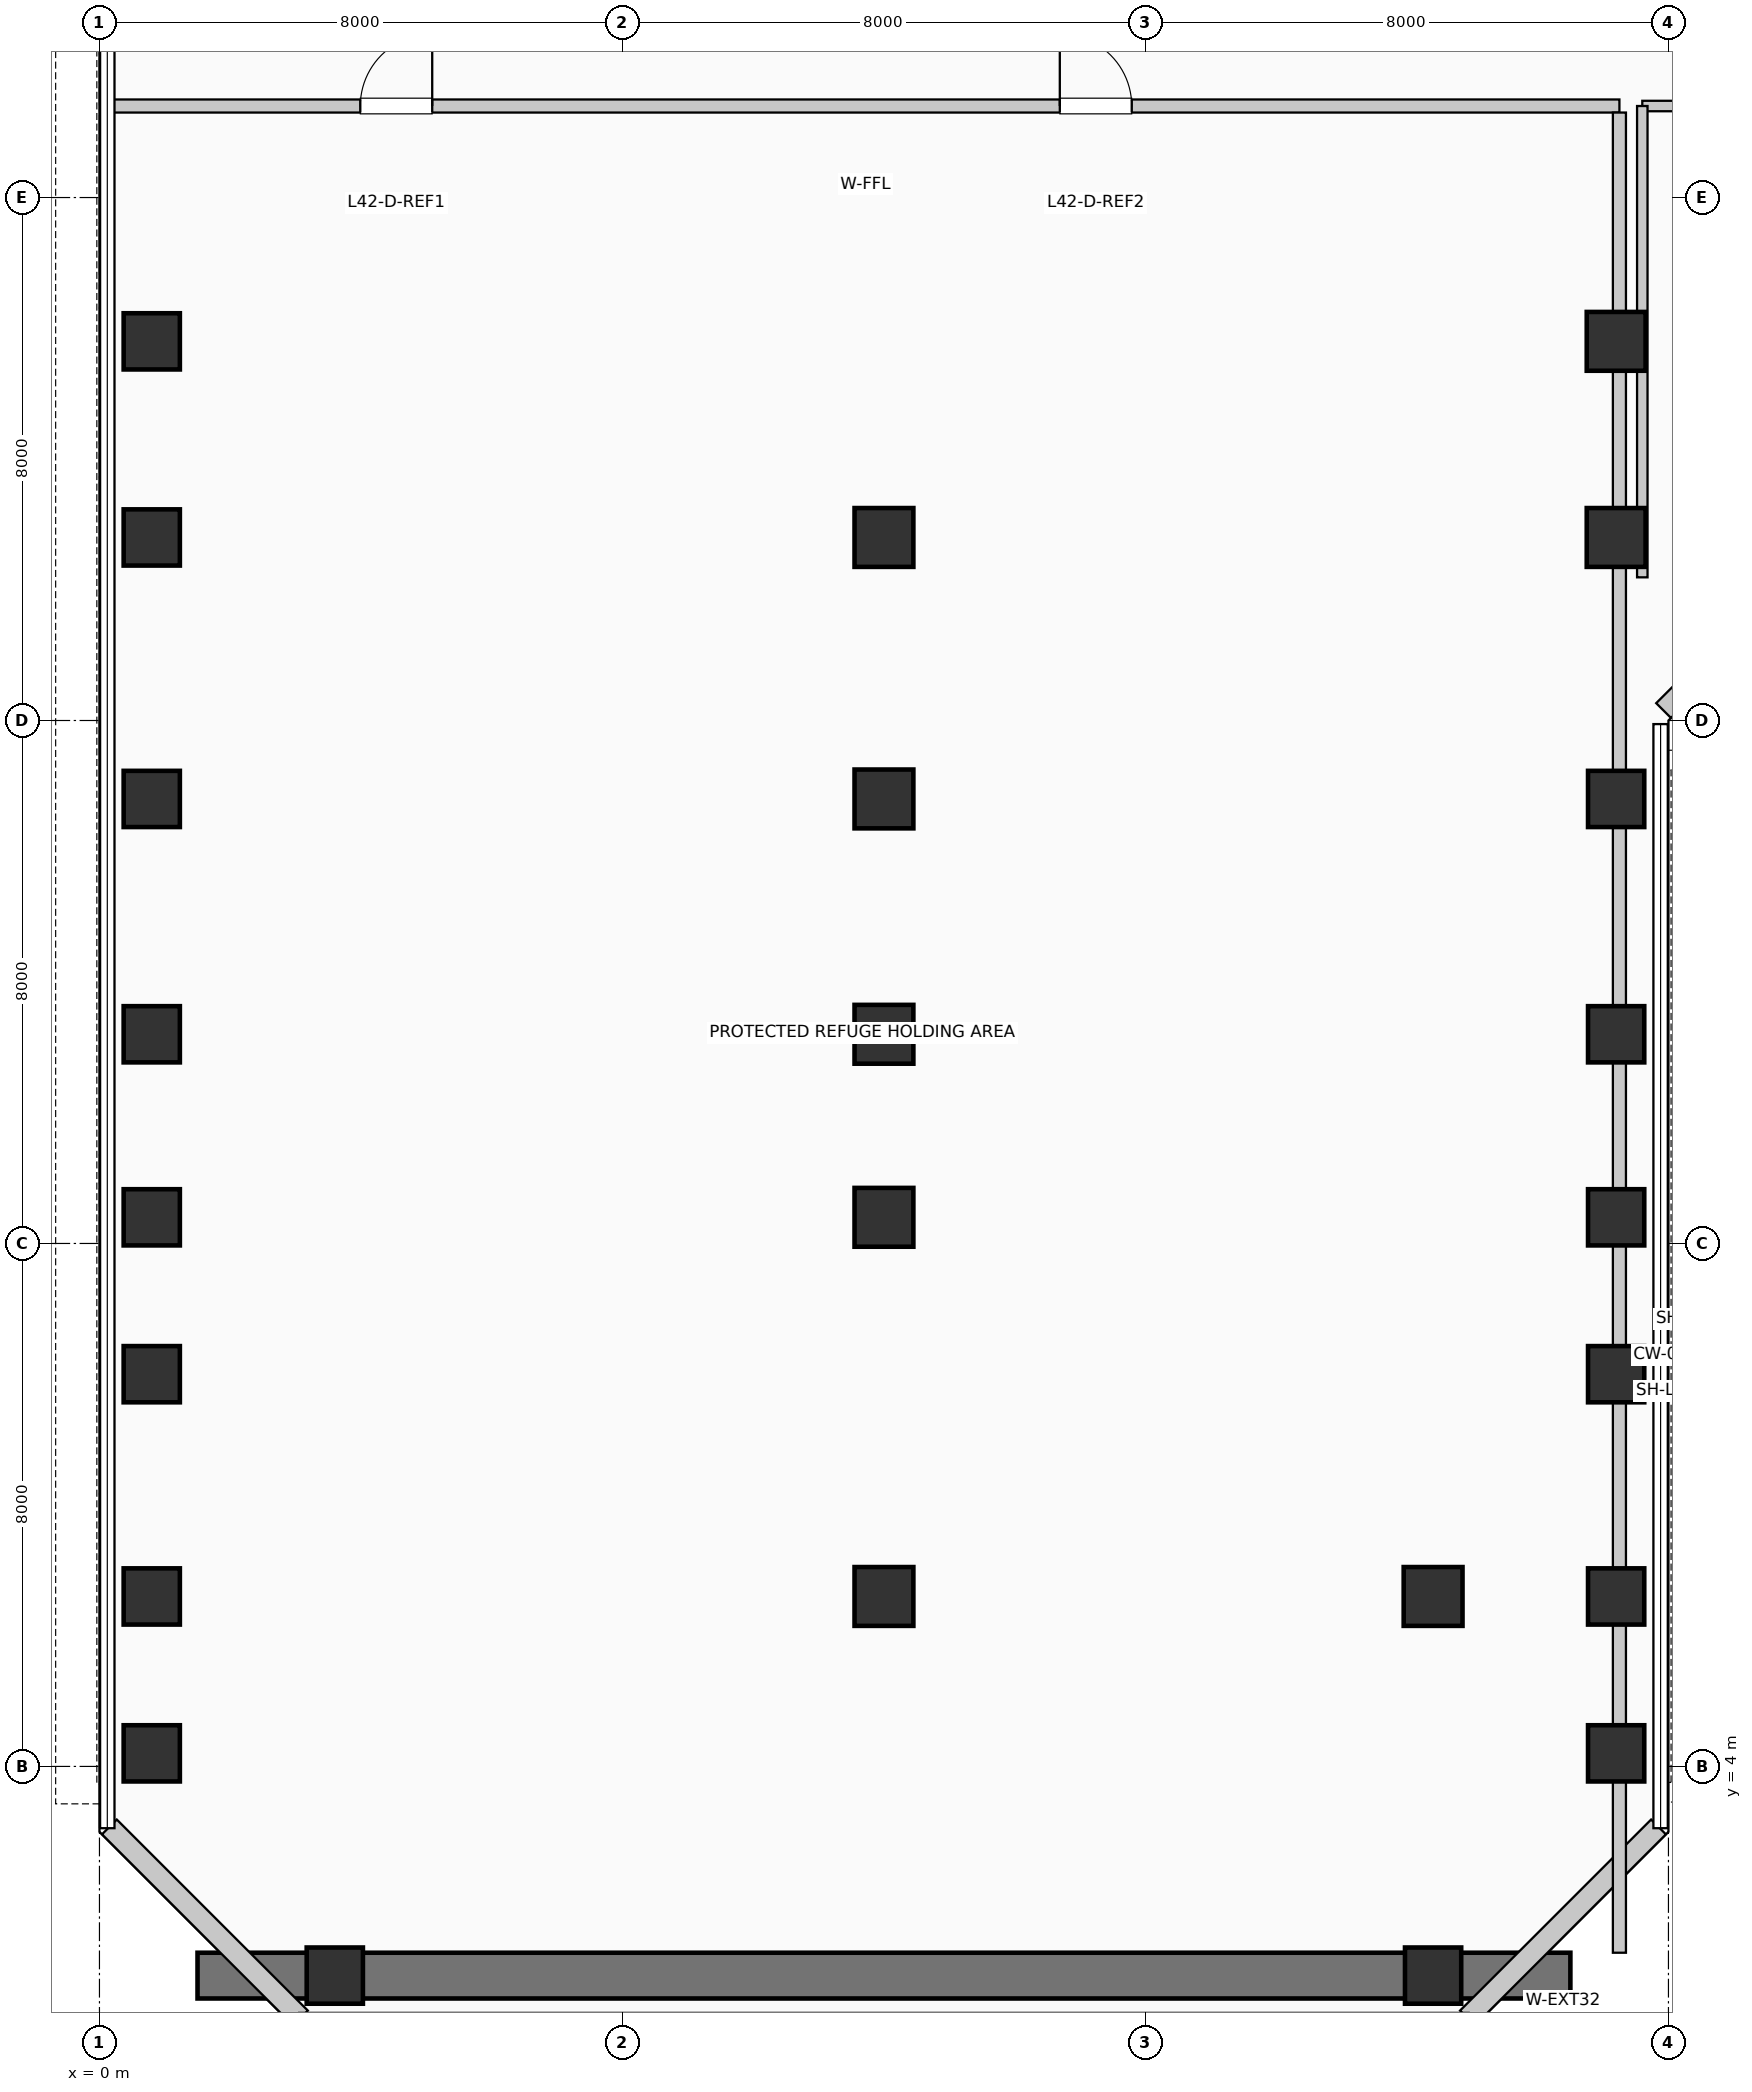
"""IFC4 building model, lengths in metres.
Left out: names, types, materials, properties, quantities, classifications, styles, units other than length and angle.
Written with IfcOpenShell. Run it as: python <this file> out.ifc"""

import sys

from ifc_helpers import new_model, si_unit, direction, frame, frame_2d, origin, origin_2d, place, context, subcontext, project, spatial, rectangle, extrude, element, fill, save


model = new_model("IFC4")
c1 = context("Model", 3, precision=1e-05, world=origin(), true_north=direction((0.0, 1.0)))
c2 = subcontext(c1, "Body", "Model", "MODEL_VIEW")
j1 = project(units=[si_unit("LENGTHUNIT", "METRE"), si_unit("PLANEANGLEUNIT", "RADIAN")], contexts=[c1])
p1 = place(None, origin())
s1 = spatial("IfcSite", under=j1, at=p1, CompositionType="ELEMENT")
p2 = place(p1, origin())
s2 = spatial("IfcBuilding", under=s1, at=p2, CompositionType="ELEMENT")
p3 = place(p2, frame((0.0, 0.0, 174.57)))
s3 = spatial("IfcBuildingStorey", under=s2, at=p3, CompositionType="ELEMENT", Elevation=174.57)
p4 = place(p3, frame((1.5, 0.8, 0.0), z_axis=(0.0, 0.0, 1.0), x_axis=(1.0, 0.0, 0.0)))
e1 = element("IfcWall", 1, at=p4, inside=s3, PredefinedType="SHEAR", context=c2, shape_type="SweptSolid", body=[
    extrude(rectangle(XDim=21.0, YDim=0.7, at=frame_2d((10.5, 0.0))), origin(), (0.0, 0.0, 1.0), 4.3),
])
for number, where, z_axis, x_axis in (
    (2, (0.8, 4.2, 0.0), (0.0, 0.0, 1.0), (1.0, 0.0, 0.0)),
    (3, (0.8, 6.6, 0.0), (0.0, 0.0, 1.0), (1.0, 0.0, 0.0)),
    (4, (0.8, 10.0, 0.0), (0.0, 0.0, 1.0), (1.0, 0.0, 0.0)),
    (5, (0.8, 12.4, 0.0), (0.0, 0.0, 1.0), (1.0, 0.0, 0.0)),
    (6, (0.8, 15.2, 0.0), (0.0, 0.0, 1.0), (1.0, 0.0, 0.0)),
    (7, (0.8, 18.8, 0.0), (0.0, 0.0, 1.0), (1.0, 0.0, 0.0)),
    (8, (0.8, 22.8, 0.0), (0.0, 0.0, 1.0), (1.0, 0.0, 0.0)),
    (9, (0.8, 25.8, 0.0), (0.0, 0.0, 1.0), (1.0, 0.0, 0.0)),
    (10, (3.6, 0.8, 0.0), (0.0, 0.0, 1.0), (1.0, 0.0, 0.0)),
):
    element("IfcColumn", number, at=place(p3, frame(where, z_axis=z_axis, x_axis=x_axis)), inside=s3, PredefinedType="COLUMN", context=c2, shape_type="SweptSolid", body=[
        extrude(rectangle(XDim=0.86, YDim=0.86, at=origin_2d()), origin(), (0.0, 0.0, 1.0), 4.95),
    ])
for number, where, z_axis, x_axis in (
    (11, (12.0, 6.6, 0.0), (0.0, 0.0, 1.0), (1.0, 0.0, 0.0)),
    (12, (12.0, 12.4, 0.0), (0.0, 0.0, 1.0), (1.0, 0.0, 0.0)),
    (13, (12.0, 15.2, 0.0), (0.0, 0.0, 1.0), (1.0, 0.0, 0.0)),
    (14, (12.0, 18.8, 0.0), (0.0, 0.0, 1.0), (1.0, 0.0, 0.0)),
    (15, (12.0, 22.8, 0.0), (0.0, 0.0, 1.0), (1.0, 0.0, 0.0)),
):
    element("IfcColumn", number, at=place(p3, frame(where, z_axis=z_axis, x_axis=x_axis)), inside=s3, PredefinedType="COLUMN", context=c2, shape_type="SweptSolid", body=[
        extrude(rectangle(XDim=0.9, YDim=0.9, at=origin_2d()), origin(), (0.0, 0.0, 1.0), 4.95),
    ])
p5 = place(p3, frame((20.4, 0.8, 0.0), z_axis=(0.0, 0.0, 1.0), x_axis=(1.0, 0.0, 0.0)))
e16 = element("IfcColumn", 16, at=p5, inside=s3, PredefinedType="COLUMN", context=c2, shape_type="SweptSolid", body=[
    extrude(rectangle(XDim=0.86, YDim=0.86, at=origin_2d()), origin(), (0.0, 0.0, 1.0), 4.95),
])
p6 = place(p3, frame((20.4, 6.6, 0.0), z_axis=(0.0, 0.0, 1.0), x_axis=(1.0, 0.0, 0.0)))
e17 = element("IfcColumn", 17, at=p6, inside=s3, PredefinedType="COLUMN", context=c2, shape_type="SweptSolid", body=[
    extrude(rectangle(XDim=0.9, YDim=0.9, at=origin_2d()), origin(), (0.0, 0.0, 1.0), 4.95),
])
for number, where, z_axis, x_axis in (
    (18, (23.2, 4.2, 0.0), (0.0, 0.0, 1.0), (1.0, 0.0, 0.0)),
    (19, (23.2, 6.6, 0.0), (0.0, 0.0, 1.0), (1.0, 0.0, 0.0)),
    (20, (23.2, 10.0, 0.0), (0.0, 0.0, 1.0), (1.0, 0.0, 0.0)),
    (21, (23.2, 12.4, 0.0), (0.0, 0.0, 1.0), (1.0, 0.0, 0.0)),
    (22, (23.2, 15.2, 0.0), (0.0, 0.0, 1.0), (1.0, 0.0, 0.0)),
    (23, (23.2, 18.8, 0.0), (0.0, 0.0, 1.0), (1.0, 0.0, 0.0)),
):
    element("IfcColumn", number, at=place(p3, frame(where, z_axis=z_axis, x_axis=x_axis)), inside=s3, PredefinedType="COLUMN", context=c2, shape_type="SweptSolid", body=[
        extrude(rectangle(XDim=0.86, YDim=0.86, at=origin_2d()), origin(), (0.0, 0.0, 1.0), 4.95),
    ])
for number, where, z_axis, x_axis in (
    (24, (23.2, 22.8, 0.0), (0.0, 0.0, 1.0), (1.0, 0.0, 0.0)),
    (25, (23.2, 25.8, 0.0), (0.0, 0.0, 1.0), (1.0, 0.0, 0.0)),
):
    element("IfcColumn", number, at=place(p3, frame(where, z_axis=z_axis, x_axis=x_axis)), inside=s3, PredefinedType="COLUMN", context=c2, shape_type="SweptSolid", body=[
        extrude(rectangle(XDim=0.9, YDim=0.9, at=origin_2d()), origin(), (0.0, 0.0, 1.0), 4.95),
    ])
p7 = place(p3, frame((20.926, 0.152, 0.0), z_axis=(0.0, 0.0, 1.0), x_axis=(0.707106781187, 0.707106781187, 0.0)))
e26 = element("IfcWall", 26, at=p7, inside=s3, PredefinedType="SOLIDWALL", context=c2, shape_type="SweptSolid", body=[
    extrude(rectangle(XDim=4.133, YDim=0.32, at=frame_2d((2.066, 0.0))), origin(), (0.0, 0.0, 1.0), 4.7),
])
p8 = place(p3, frame((23.926, 20.152, 0.0), z_axis=(0.0, 0.0, 1.0), x_axis=(0.707106781187, 0.707106781187, 0.0)))
e27 = element("IfcWall", 27, at=p8, inside=s3, PredefinedType="SOLIDWALL", context=c2, shape_type="SweptSolid", body=[
    extrude(rectangle(XDim=2.718, YDim=0.32, at=frame_2d((1.359, 0.0))), origin(), (0.0, 0.0, 1.0), 4.7),
])
p9 = place(p3, frame((0.152, 3.074, 0.0), z_axis=(0.0, 0.0, 1.0), x_axis=(0.707106781187, -0.707106781187, 0.0)))
e28 = element("IfcWall", 28, at=p9, inside=s3, PredefinedType="SOLIDWALL", context=c2, shape_type="SweptSolid", body=[
    extrude(rectangle(XDim=4.133, YDim=0.32, at=frame_2d((2.066, 0.0))), origin(), (0.0, 0.0, 1.0), 4.7),
])
p10 = place(p3, frame((0.19, 29.4, 0.0), z_axis=(0.0, 0.0, 1.0), x_axis=(1.0, 0.0, 0.0)))
e29 = element("IfcWall", 29, at=p10, inside=s3, PredefinedType="PARTITIONING", context=c2, shape_type="SweptSolid", body=[
    extrude(rectangle(XDim=23.06, YDim=0.2, at=frame_2d((11.53, 0.0))), origin(), (0.0, 0.0, 1.0), 4.355),
])
p11 = place(p10, frame((3.8, 0.0, 0.0)))
e30 = element("IfcOpeningElement", 30, at=p11, cuts=e29, PredefinedType="OPENING", context=c2, shape_type="SweptSolid", body=[
    extrude(rectangle(XDim=1.1, YDim=2.15, at=frame_2d((0.55, 1.075))), frame((0.0, 0.11, 0.0), z_axis=(0.0, -1.0, 0.0), x_axis=(1.0, 0.0, 0.0)), (0.0, 0.0, 1.0), 0.22),
])
p12 = place(p10, frame((14.5, 0.0, 0.0)))
e31 = element("IfcOpeningElement", 31, at=p12, cuts=e29, PredefinedType="OPENING", context=c2, shape_type="SweptSolid", body=[
    extrude(rectangle(XDim=1.1, YDim=2.15, at=frame_2d((0.55, 1.075))), frame((0.0, 0.11, 0.0), z_axis=(0.0, -1.0, 0.0), x_axis=(1.0, 0.0, 0.0)), (0.0, 0.0, 1.0), 0.22),
])
p13 = place(p3, frame((23.25, 1.15, 0.0), z_axis=(0.0, 0.0, 1.0), x_axis=(0.0, 1.0, 0.0)))
e32 = element("IfcWall", 32, at=p13, inside=s3, PredefinedType="PARTITIONING", context=c2, shape_type="SweptSolid", body=[
    extrude(rectangle(XDim=28.15, YDim=0.2, at=frame_2d((14.075, 0.0))), origin(), (0.0, 0.0, 1.0), 4.035),
])
p14 = place(p3, frame((23.6, 29.4, 0.0), z_axis=(0.0, 0.0, 1.0), x_axis=(1.0, 0.0, 0.0)))
e33 = element("IfcWall", 33, at=p14, inside=s3, PredefinedType="PARTITIONING", context=c2, shape_type="SweptSolid", body=[
    extrude(rectangle(XDim=25.45, YDim=0.16, at=frame_2d((12.725, 0.0))), origin(), (0.0, 0.0, 1.0), 4.355),
])
p15 = place(p14, frame((3.0, 0.0, 0.0)))
e34 = element("IfcOpeningElement", 34, at=p15, cuts=e33, PredefinedType="OPENING", context=c2, shape_type="SweptSolid", body=[
    extrude(rectangle(XDim=0.95, YDim=2.1, at=frame_2d((0.475, 1.05))), frame((0.0, 0.09, 0.0), z_axis=(0.0, -1.0, 0.0), x_axis=(1.0, 0.0, 0.0)), (0.0, 0.0, 1.0), 0.18),
])
p16 = place(p3, frame((23.6, 22.19, 0.0), z_axis=(0.0, 0.0, 1.0), x_axis=(0.0, 1.0, 0.0)))
e35 = element("IfcWall", 35, at=p16, inside=s3, PredefinedType="PARTITIONING", context=c2, shape_type="SweptSolid", body=[
    extrude(rectangle(XDim=7.21, YDim=0.16, at=frame_2d((3.605, 0.0))), origin(), (0.0, 0.0, 1.0), 4.035),
])
p17 = place(p11, origin())
e36 = element("IfcDoor", 36, at=p17, inside=s3, OperationType="SINGLE_SWING_RIGHT", PredefinedType="DOOR", context=c2, shape_type="SweptSolid", body=[
    extrude(rectangle(XDim=1.1, YDim=2.15, at=frame_2d((0.55, 1.075))), frame((0.0, 0.025, 0.0), z_axis=(0.0, -1.0, 0.0), x_axis=(1.0, 0.0, 0.0)), (0.0, 0.0, 1.0), 0.05),
])
fill(e30, e36)
p18 = place(p12, origin())
e37 = element("IfcDoor", 37, at=p18, inside=s3, OperationType="SINGLE_SWING_LEFT", PredefinedType="DOOR", context=c2, shape_type="SweptSolid", body=[
    extrude(rectangle(XDim=1.1, YDim=2.15, at=frame_2d((0.55, 1.075))), frame((0.0, 0.025, 0.0), z_axis=(0.0, -1.0, 0.0), x_axis=(1.0, 0.0, 0.0)), (0.0, 0.0, 1.0), 0.05),
])
fill(e31, e37)
save(model, sys.argv[1])
